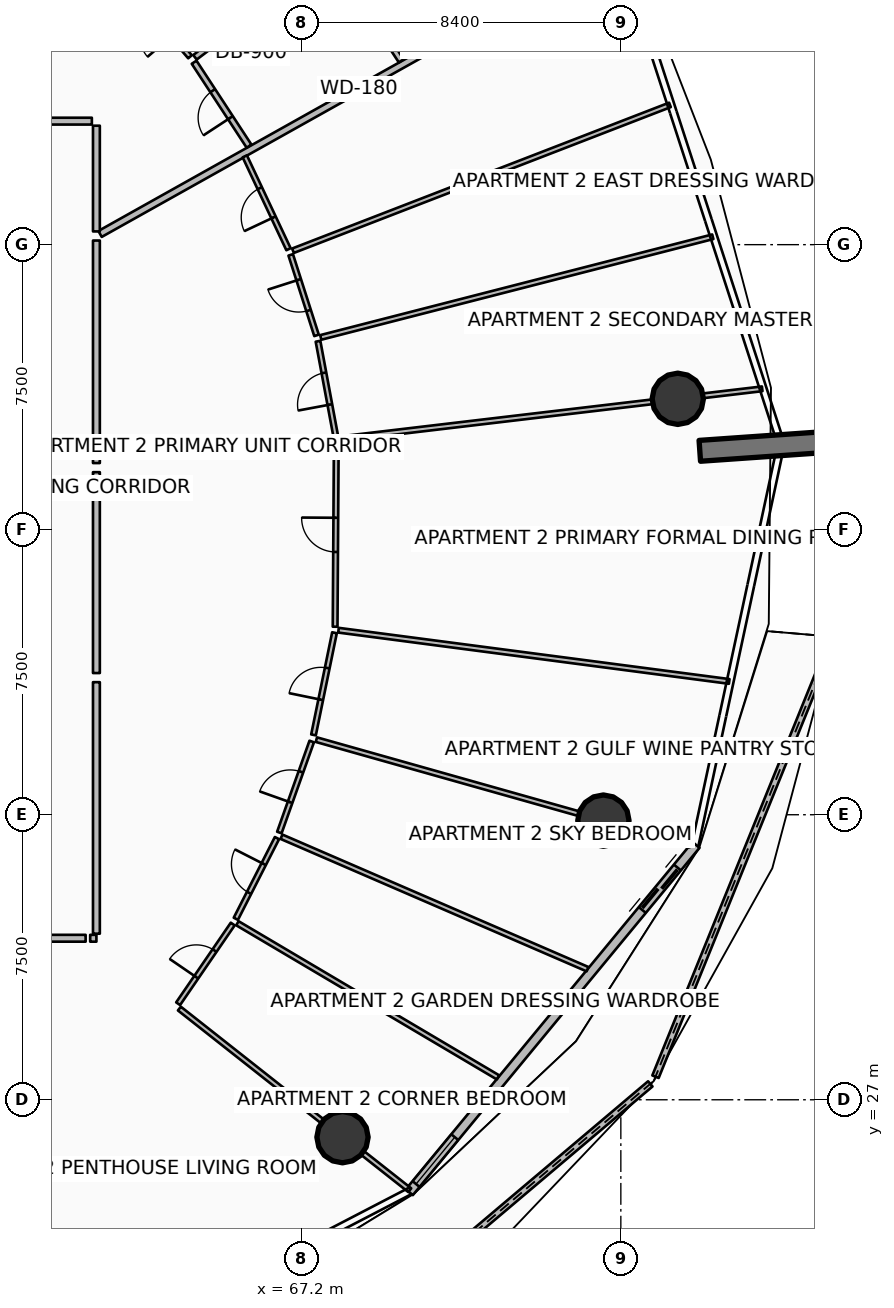
"""IFC4 building model, lengths in metres.
Left out: names, types, materials, properties, quantities, classifications, styles, units other than length and angle.
Written with IfcOpenShell. Run it as: python <this file> out.ifc"""

import sys

from ifc_helpers import new_model, si_unit, direction, frame, frame_2d, origin, origin_2d, place, context, subcontext, project, spatial, polyline, rectangle, circle, outline, extrude, element, fill, save


model = new_model("IFC4")
c1 = context("Model", 3, precision=1e-05, world=origin(), true_north=direction((0.0, 1.0)))
c2 = subcontext(c1, "Body", "Model", "MODEL_VIEW")
j1 = project(units=[si_unit("LENGTHUNIT", "METRE"), si_unit("PLANEANGLEUNIT", "RADIAN")], contexts=[c1])
p1 = place(None, origin())
s1 = spatial("IfcSite", under=j1, at=p1, CompositionType="ELEMENT")
p2 = place(p1, origin())
s2 = spatial("IfcBuilding", under=s1, at=p2, CompositionType="ELEMENT")
p3 = place(p2, frame((0.0, 0.0, 37.65)))
s3 = spatial("IfcBuildingStorey", under=s2, at=p3, CompositionType="ELEMENT", Elevation=37.65)
p4 = place(p3, frame((77.678, 44.075, 0.0), z_axis=(0.0, 0.0, 1.0), x_axis=(0.997564163539, 0.069754853754, 0.0)))
e1 = element("IfcWall", 1, at=p4, inside=s3, PredefinedType="SOLIDWALL", context=c2, shape_type="SweptSolid", body=[
    extrude(rectangle(XDim=3.5, YDim=0.55, at=frame_2d((1.75, 0.0))), origin(), (0.0, 0.0, 1.0), 3.75),
])
for number, where, z_axis, x_axis in (
    (2, (68.276, 26.016, 0.0), (0.0, 0.0, 1.0), (1.0, 0.0, 0.0)),
    (3, (75.141, 34.345, 0.0), (0.0, 0.0, 1.0), (1.0, 0.0, 0.0)),
    (4, (77.098, 45.444, 0.0), (0.0, 0.0, 1.0), (1.0, 0.0, 0.0)),
):
    element("IfcColumn", number, at=place(p3, frame(where, z_axis=z_axis, x_axis=x_axis)), inside=s3, PredefinedType="COLUMN", context=c2, shape_type="SweptSolid", body=[
        extrude(circle(Radius=0.675, at=origin_2d()), origin(), (0.0, 0.0, 1.0), 3.5),
    ])
p5 = place(p3, frame((67.267, 19.719, 0.0), z_axis=(0.0, 0.0, 1.0), x_axis=(0.763702211542, 0.645568688898, 0.0)))
e5 = element("IfcWall", 5, at=p5, inside=s3, PredefinedType="PARAPET", context=c2, shape_type="SweptSolid", body=[
    extrude(outline(polyline([(0.0, 0.0), (11.927, 0.0), (11.927, 1.632), (5.963, 1.798), (0.0, 1.86), (0.0, 0.0)])), frame((0.0, 0.09, 0.0), z_axis=(0.0, -1.0, 0.0), x_axis=(1.0, 0.0, 0.0)), (0.0, 0.0, 1.0), 0.18),
])
p6 = place(p3, frame((76.512, 27.607, 0.0), z_axis=(0.0, 0.0, 1.0), x_axis=(0.375733690411, 0.926727680546, 0.0)))
e6 = element("IfcWall", 6, at=p6, inside=s3, PredefinedType="PARAPET", context=c2, shape_type="SweptSolid", body=[
    extrude(outline(polyline([(0.0, 0.0), (12.491, 0.0), (12.491, 1.233), (6.246, 1.418), (0.0, 1.632), (0.0, 0.0)])), frame((0.0, 0.09, 0.0), z_axis=(0.0, -1.0, 0.0), x_axis=(1.0, 0.0, 0.0)), (0.0, 0.0, 1.0), 0.18),
])
p7 = place(p3, frame((70.033, 24.567, 0.0), z_axis=(0.0, 0.0, 1.0), x_axis=(0.636674332663, 0.771132799281, 0.0)))
e7 = element("IfcWall", 7, at=p7, inside=s3, PredefinedType="SOLIDWALL", context=c2, shape_type="SweptSolid", body=[
    extrude(rectangle(XDim=11.851, YDim=0.24, at=frame_2d((5.926, 0.0))), origin(), (0.0, 0.0, 1.0), 2.45),
])
p8 = place(p7, frame((9.631, 0.0, 0.0)))
e8 = element("IfcOpeningElement", 8, at=p8, cuts=e7, PredefinedType="OPENING", context=c2, shape_type="SweptSolid", body=[
    extrude(rectangle(XDim=1.45, YDim=2.15, at=frame_2d((0.725, 1.075))), frame((0.0, 0.13, 0.0), z_axis=(0.0, -1.0, 0.0), x_axis=(1.0, 0.0, 0.0)), (0.0, 0.0, 1.0), 0.26),
])
p9 = place(p7, frame((0.28, 0.0, 0.65)))
e9 = element("IfcOpeningElement", 9, at=p9, cuts=e7, PredefinedType="OPENING", context=c2, shape_type="SweptSolid", body=[
    extrude(rectangle(XDim=1.6, YDim=1.5, at=frame_2d((0.8, 0.75))), frame((0.0, 0.13, 0.0), z_axis=(0.0, -1.0, 0.0), x_axis=(1.0, 0.0, 0.0)), (0.0, 0.0, 1.0), 0.26),
])
p10 = place(p3, frame((61.896, 49.782, 0.0), z_axis=(0.0, 0.0, 1.0), x_axis=(0.872493215695, 0.488626225828, 0.0)))
e10 = element("IfcWall", 10, at=p10, inside=s3, PredefinedType="PARTITIONING", context=c2, shape_type="SweptSolid", body=[
    extrude(rectangle(XDim=15.612, YDim=0.18, at=frame_2d((7.806, 0.0))), origin(), (0.0, 0.0, 1.0), 2.867),
])
p11 = place(p3, frame((61.8, 49.848, 0.0), z_axis=(0.0, 0.0, 1.0), x_axis=(0.0, 1.0, 0.0)))
e11 = element("IfcWall", 11, at=p11, inside=s3, PredefinedType="PARTITIONING", context=c2, shape_type="SweptSolid", body=[
    extrude(rectangle(XDim=2.781, YDim=0.18, at=frame_2d((1.391, 0.0))), origin(), (0.0, 0.0, 1.0), 2.867),
])
p12 = place(p3, frame((61.68, 52.75, 0.0), z_axis=(0.0, 0.0, 1.0), x_axis=(-1.0, 0.0, 0.0)))
e12 = element("IfcWall", 12, at=p12, inside=s3, PredefinedType="PARTITIONING", context=c2, shape_type="SweptSolid", body=[
    extrude(rectangle(XDim=5.085, YDim=0.18, at=frame_2d((2.543, 0.0))), origin(), (0.0, 0.0, 1.0), 2.867),
])
p13 = place(p3, frame((65.816, 52.092, 0.0), z_axis=(0.0, 0.0, 1.0), x_axis=(-0.547635625156, 0.836716930664, 0.0)))
e13 = element("IfcWall", 13, at=p13, inside=s3, PredefinedType="PARTITIONING", context=c2, shape_type="SweptSolid", body=[
    extrude(rectangle(XDim=2.639, YDim=0.15, at=frame_2d((1.32, 0.0))), origin(), (0.0, 0.0, 1.0), 2.867),
])
p14 = place(p13, frame((0.895, 0.0, 0.0)))
e14 = element("IfcOpeningElement", 14, at=p14, cuts=e13, PredefinedType="OPENING", context=c2, shape_type="SweptSolid", body=[
    extrude(rectangle(XDim=0.85, YDim=2.06, at=frame_2d((0.425, 1.03))), frame((0.0, 0.085, 0.0), z_axis=(0.0, -1.0, 0.0), x_axis=(1.0, 0.0, 0.0)), (0.0, 0.0, 1.0), 0.17),
])
p15 = place(p3, frame((69.821, 54.335, 0.0), z_axis=(0.0, 0.0, 1.0), x_axis=(-0.547709492592, 0.836668579382, 0.0)))
e15 = element("IfcWall", 15, at=p15, inside=s3, PredefinedType="PARTITIONING", context=c2, shape_type="SweptSolid", body=[
    extrude(rectangle(XDim=3.273, YDim=0.15, at=frame_2d((1.637, 0.0))), origin(), (0.0, 0.0, 1.0), 2.867),
])
p16 = place(p3, frame((64.394, 54.43, 0.0), z_axis=(0.0, 0.0, 1.0), x_axis=(0.796855751732, 0.604169604442, 0.0)))
e16 = element("IfcWall", 16, at=p16, inside=s3, PredefinedType="PARTITIONING", context=c2, shape_type="SweptSolid", body=[
    extrude(rectangle(XDim=4.46, YDim=0.15, at=frame_2d((2.23, 0.0))), origin(), (0.0, 0.0, 1.0), 2.94),
])
p17 = place(p3, frame((64.263, 54.444, 0.0), z_axis=(0.0, 0.0, 1.0), x_axis=(-0.651227570151, 0.758882502022, 0.0)))
e17 = element("IfcWall", 17, at=p17, inside=s3, PredefinedType="PARTITIONING", context=c2, shape_type="SweptSolid", body=[
    extrude(rectangle(XDim=2.304, YDim=0.125, at=frame_2d((1.152, 0.0))), origin(), (0.0, 0.0, 1.0), 2.94),
])
p18 = place(p17, frame((0.727, 0.0, 0.0)))
e18 = element("IfcOpeningElement", 18, at=p18, cuts=e17, PredefinedType="OPENING", context=c2, shape_type="SweptSolid", body=[
    extrude(rectangle(XDim=0.85, YDim=2.06, at=frame_2d((0.425, 1.03))), frame((0.0, 0.073, 0.0), z_axis=(0.0, -1.0, 0.0), x_axis=(1.0, 0.0, 0.0)), (0.0, 0.0, 1.0), 0.145),
])
p19 = place(p3, frame((54.14, 31.25, 0.0), z_axis=(0.0, 0.0, 1.0), x_axis=(1.0, 0.0, 0.0)))
e19 = element("IfcWall", 19, at=p19, inside=s3, PredefinedType="PARTITIONING", context=c2, shape_type="SweptSolid", body=[
    extrude(rectangle(XDim=7.376, YDim=0.18, at=frame_2d((3.688, 0.0))), origin(), (0.0, 0.0, 1.0), 2.867),
])
p20 = place(p19, frame((3.138, 0.0, 0.0)))
e20 = element("IfcOpeningElement", 20, at=p20, cuts=e19, PredefinedType="OPENING", context=c2, shape_type="SweptSolid", body=[
    extrude(rectangle(XDim=1.1, YDim=2.1, at=frame_2d((0.55, 1.05))), frame((0.0, 0.1, 0.0), z_axis=(0.0, -1.0, 0.0), x_axis=(1.0, 0.0, 0.0)), (0.0, 0.0, 1.0), 0.2),
])
p21 = place(p3, frame((61.636, 31.25, 0.0), z_axis=(0.0, 0.0, 1.0), x_axis=(1.0, 0.0, 0.0)))
e21 = element("IfcWall", 21, at=p21, inside=s3, PredefinedType="PARTITIONING", context=c2, shape_type="SweptSolid", body=[
    extrude(rectangle(XDim=0.164, YDim=0.18, at=frame_2d((0.082, 0.0))), origin(), (0.0, 0.0, 1.0), 2.867),
])
p22 = place(p3, frame((61.8, 31.37, 0.0), z_axis=(0.0, 0.0, 1.0), x_axis=(0.0, 1.0, 0.0)))
e22 = element("IfcWall", 22, at=p22, inside=s3, PredefinedType="PARTITIONING", context=c2, shape_type="SweptSolid", body=[
    extrude(rectangle(XDim=6.618, YDim=0.18, at=frame_2d((3.309, 0.0))), origin(), (0.0, 0.0, 1.0), 2.867),
])
p23 = place(p3, frame((63.983, 29.4, 0.0), z_axis=(0.0, 0.0, 1.0), x_axis=(0.785322984339, -0.619086270457, 0.0)))
e23 = element("IfcWall", 23, at=p23, inside=s3, PredefinedType="PARTITIONING", context=c2, shape_type="SweptSolid", body=[
    extrude(rectangle(XDim=7.719, YDim=0.125, at=frame_2d((3.86, 0.0))), origin(), (0.0, 0.0, 1.0), 2.867),
])
p24 = place(p3, frame((65.51, 31.645, 0.0), z_axis=(0.0, 0.0, 1.0), x_axis=(0.86074163886, -0.509042072065, 0.0)))
e24 = element("IfcWall", 24, at=p24, inside=s3, PredefinedType="PARTITIONING", context=c2, shape_type="SweptSolid", body=[
    extrude(rectangle(XDim=7.968, YDim=0.125, at=frame_2d((3.984, 0.0))), origin(), (0.0, 0.0, 1.0), 2.94),
])
p25 = place(p3, frame((66.67, 33.921, 0.0), z_axis=(0.0, 0.0, 1.0), x_axis=(0.917747697885, -0.397163899451, 0.0)))
e25 = element("IfcWall", 25, at=p25, inside=s3, PredefinedType="PARTITIONING", context=c2, shape_type="SweptSolid", body=[
    extrude(rectangle(XDim=8.775, YDim=0.125, at=frame_2d((4.387, 0.0))), origin(), (0.0, 0.0, 1.0), 2.94),
])
p26 = place(p3, frame((63.95, 29.528, 0.0), z_axis=(0.0, 0.0, 1.0), x_axis=(0.565358509176, 0.824845292223, 0.0)))
e26 = element("IfcWall", 26, at=p26, inside=s3, PredefinedType="PARTITIONING", context=c2, shape_type="SweptSolid", body=[
    extrude(rectangle(XDim=2.542, YDim=0.125, at=frame_2d((1.271, 0.0))), origin(), (0.0, 0.0, 1.0), 2.867),
])
p27 = place(p26, frame((0.846, 0.0, 0.0)))
e27 = element("IfcOpeningElement", 27, at=p27, cuts=e26, PredefinedType="OPENING", context=c2, shape_type="SweptSolid", body=[
    extrude(rectangle(XDim=0.85, YDim=2.06, at=frame_2d((0.425, 1.03))), frame((0.0, 0.073, 0.0), z_axis=(0.0, -1.0, 0.0), x_axis=(1.0, 0.0, 0.0)), (0.0, 0.0, 1.0), 0.145),
])
p28 = place(p3, frame((65.469, 31.762, 0.0), z_axis=(0.0, 0.0, 1.0), x_axis=(0.45400250644, 0.891000406367, 0.0)))
e28 = element("IfcWall", 28, at=p28, inside=s3, PredefinedType="PARTITIONING", context=c2, shape_type="SweptSolid", body=[
    extrude(rectangle(XDim=2.383, YDim=0.125, at=frame_2d((1.192, 0.0))), origin(), (0.0, 0.0, 1.0), 2.94),
])
p29 = place(p28, frame((0.767, 0.0, 0.0)))
e29 = element("IfcOpeningElement", 29, at=p29, cuts=e28, PredefinedType="OPENING", context=c2, shape_type="SweptSolid", body=[
    extrude(rectangle(XDim=0.85, YDim=2.06, at=frame_2d((0.425, 1.03))), frame((0.0, 0.073, 0.0), z_axis=(0.0, -1.0, 0.0), x_axis=(1.0, 0.0, 0.0)), (0.0, 0.0, 1.0), 0.145),
])
p30 = place(p3, frame((66.614, 34.032, 0.0), z_axis=(0.0, 0.0, 1.0), x_axis=(0.335094930465, 0.942184370268, 0.0)))
e30 = element("IfcWall", 30, at=p30, inside=s3, PredefinedType="PARTITIONING", context=c2, shape_type="SweptSolid", body=[
    extrude(rectangle(XDim=2.542, YDim=0.125, at=frame_2d((1.271, 0.0))), origin(), (0.0, 0.0, 1.0), 2.867),
])
p31 = place(p30, frame((0.846, 0.0, 0.0)))
e31 = element("IfcOpeningElement", 31, at=p31, cuts=e30, PredefinedType="OPENING", context=c2, shape_type="SweptSolid", body=[
    extrude(rectangle(XDim=0.85, YDim=2.06, at=frame_2d((0.425, 1.03))), frame((0.0, 0.073, 0.0), z_axis=(0.0, -1.0, 0.0), x_axis=(1.0, 0.0, 0.0)), (0.0, 0.0, 1.0), 0.145),
])
p32 = place(p3, frame((61.8, 38.228, 0.0), z_axis=(0.0, 0.0, 1.0), x_axis=(0.0, 1.0, 0.0)))
e32 = element("IfcWall", 32, at=p32, inside=s3, PredefinedType="PARTITIONING", context=c2, shape_type="SweptSolid", body=[
    extrude(rectangle(XDim=5.285, YDim=0.18, at=frame_2d((2.643, 0.0))), origin(), (0.0, 0.0, 1.0), 2.867),
])
p33 = place(p3, frame((67.589, 36.475, 0.0), z_axis=(0.0, 0.0, 1.0), x_axis=(0.962457516126, -0.271432366627, 0.0)))
e33 = element("IfcWall", 33, at=p33, inside=s3, PredefinedType="PARTITIONING", context=c2, shape_type="SweptSolid", body=[
    extrude(rectangle(XDim=10.221, YDim=0.125, at=frame_2d((5.111, 0.0))), origin(), (0.0, 0.0, 1.0), 2.867),
])
p34 = place(p3, frame((68.17, 39.355, 0.0), z_axis=(0.0, 0.0, 1.0), x_axis=(0.991512615626, -0.130010511326, 0.0)))
e34 = element("IfcWall", 34, at=p34, inside=s3, PredefinedType="PARTITIONING", context=c2, shape_type="SweptSolid", body=[
    extrude(rectangle(XDim=10.369, YDim=0.125, at=frame_2d((5.185, 0.0))), origin(), (0.0, 0.0, 1.0), 2.94),
])
p35 = place(p3, frame((67.513, 36.601, 0.0), z_axis=(0.0, 0.0, 1.0), x_axis=(0.201246233374, 0.979540684991, 0.0)))
e35 = element("IfcWall", 35, at=p35, inside=s3, PredefinedType="PARTITIONING", context=c2, shape_type="SweptSolid", body=[
    extrude(rectangle(XDim=2.744, YDim=0.125, at=frame_2d((1.372, 0.0))), origin(), (0.0, 0.0, 1.0), 2.867),
])
p36 = place(p35, frame((0.947, 0.0, 0.0)))
e36 = element("IfcOpeningElement", 36, at=p36, cuts=e35, PredefinedType="OPENING", context=c2, shape_type="SweptSolid", body=[
    extrude(rectangle(XDim=0.85, YDim=2.06, at=frame_2d((0.425, 1.03))), frame((0.0, 0.073, 0.0), z_axis=(0.0, -1.0, 0.0), x_axis=(1.0, 0.0, 0.0)), (0.0, 0.0, 1.0), 0.145),
])
p37 = place(p3, frame((68.082, 39.447, 0.0), z_axis=(0.0, 0.0, 1.0), x_axis=(0.006313643226, 0.999980068756, 0.0)))
e37 = element("IfcWall", 37, at=p37, inside=s3, PredefinedType="PARTITIONING", context=c2, shape_type="SweptSolid", body=[
    extrude(rectangle(XDim=4.833, YDim=0.125, at=frame_2d((2.417, 0.0))), origin(), (0.0, 0.0, 1.0), 2.867),
])
p38 = place(p37, frame((1.967, 0.0, 0.0)))
e38 = element("IfcOpeningElement", 38, at=p38, cuts=e37, PredefinedType="OPENING", context=c2, shape_type="SweptSolid", body=[
    extrude(rectangle(XDim=0.9, YDim=2.08, at=frame_2d((0.45, 1.04))), frame((0.0, 0.073, 0.0), z_axis=(0.0, -1.0, 0.0), x_axis=(1.0, 0.0, 0.0)), (0.0, 0.0, 1.0), 0.145),
])
p39 = place(p3, frame((61.8, 43.753, 0.0), z_axis=(0.0, 0.0, 1.0), x_axis=(0.0, 1.0, 0.0)))
e39 = element("IfcWall", 39, at=p39, inside=s3, PredefinedType="PARTITIONING", context=c2, shape_type="SweptSolid", body=[
    extrude(rectangle(XDim=5.855, YDim=0.18, at=frame_2d((2.927, 0.0))), origin(), (0.0, 0.0, 1.0), 2.867),
])
p40 = place(p3, frame((68.212, 44.392, 0.0), z_axis=(0.0, 0.0, 1.0), x_axis=(0.993068868454, 0.117533920671, 0.0)))
e40 = element("IfcWall", 40, at=p40, inside=s3, PredefinedType="PARTITIONING", context=c2, shape_type="SweptSolid", body=[
    extrude(rectangle(XDim=11.186, YDim=0.125, at=frame_2d((5.593, 0.0))), origin(), (0.0, 0.0, 1.0), 2.867),
])
p41 = place(p3, frame((67.704, 47.059, 0.0), z_axis=(0.0, 0.0, 1.0), x_axis=(0.968581650893, 0.248695769071, 0.0)))
e41 = element("IfcWall", 41, at=p41, inside=s3, PredefinedType="PARTITIONING", context=c2, shape_type="SweptSolid", body=[
    extrude(rectangle(XDim=10.65, YDim=0.125, at=frame_2d((5.325, 0.0))), origin(), (0.0, 0.0, 1.0), 2.94),
])
p42 = place(p3, frame((66.973, 49.34, 0.0), z_axis=(0.0, 0.0, 1.0), x_axis=(0.93264336061, 0.360799614621, 0.0)))
e42 = element("IfcWall", 42, at=p42, inside=s3, PredefinedType="PARTITIONING", context=c2, shape_type="SweptSolid", body=[
    extrude(rectangle(XDim=10.636, YDim=0.125, at=frame_2d((5.318, 0.0))), origin(), (0.0, 0.0, 1.0), 2.94),
])
p43 = place(p3, frame((68.098, 44.459, 0.0), z_axis=(0.0, 0.0, 1.0), x_axis=(-0.183523097457, 0.983015397997, 0.0)))
e43 = element("IfcWall", 43, at=p43, inside=s3, PredefinedType="PARTITIONING", context=c2, shape_type="SweptSolid", body=[
    extrude(rectangle(XDim=2.542, YDim=0.125, at=frame_2d((1.271, 0.0))), origin(), (0.0, 0.0, 1.0), 2.867),
])
p44 = place(p43, frame((0.846, 0.0, 0.0)))
e44 = element("IfcOpeningElement", 44, at=p44, cuts=e43, PredefinedType="OPENING", context=c2, shape_type="SweptSolid", body=[
    extrude(rectangle(XDim=0.85, YDim=2.06, at=frame_2d((0.425, 1.03))), frame((0.0, 0.073, 0.0), z_axis=(0.0, -1.0, 0.0), x_axis=(1.0, 0.0, 0.0)), (0.0, 0.0, 1.0), 0.145),
])
p45 = place(p3, frame((67.592, 47.113, 0.0), z_axis=(0.0, 0.0, 1.0), x_axis=(-0.305309270218, 0.952253248626, 0.0)))
e45 = element("IfcWall", 45, at=p45, inside=s3, PredefinedType="PARTITIONING", context=c2, shape_type="SweptSolid", body=[
    extrude(rectangle(XDim=2.225, YDim=0.125, at=frame_2d((1.112, 0.0))), origin(), (0.0, 0.0, 1.0), 2.94),
])
p46 = place(p45, frame((0.687, 0.0, 0.0)))
e46 = element("IfcOpeningElement", 46, at=p46, cuts=e45, PredefinedType="OPENING", context=c2, shape_type="SweptSolid", body=[
    extrude(rectangle(XDim=0.85, YDim=2.06, at=frame_2d((0.425, 1.03))), frame((0.0, 0.073, 0.0), z_axis=(0.0, -1.0, 0.0), x_axis=(1.0, 0.0, 0.0)), (0.0, 0.0, 1.0), 0.145),
])
p47 = place(p3, frame((66.854, 49.38, 0.0), z_axis=(0.0, 0.0, 1.0), x_axis=(-0.425714313245, 0.904857626093, 0.0)))
e47 = element("IfcWall", 47, at=p47, inside=s3, PredefinedType="PARTITIONING", context=c2, shape_type="SweptSolid", body=[
    extrude(rectangle(XDim=2.7, YDim=0.125, at=frame_2d((1.35, 0.0))), origin(), (0.0, 0.0, 1.0), 2.867),
])
p48 = place(p47, frame((0.925, 0.0, 0.0)))
e48 = element("IfcOpeningElement", 48, at=p48, cuts=e47, PredefinedType="OPENING", context=c2, shape_type="SweptSolid", body=[
    extrude(rectangle(XDim=0.85, YDim=2.06, at=frame_2d((0.425, 1.03))), frame((0.0, 0.073, 0.0), z_axis=(0.0, -1.0, 0.0), x_axis=(1.0, 0.0, 0.0)), (0.0, 0.0, 1.0), 0.145),
])
p49 = place(p8, origin())
e49 = element("IfcDoor", 49, at=p49, inside=s3, OperationType="DOUBLE_DOOR_SLIDING", PredefinedType="DOOR", context=c2, shape_type="SweptSolid", body=[
    extrude(rectangle(XDim=1.45, YDim=2.15, at=frame_2d((0.725, 1.075))), frame((0.0, 0.025, 0.0), z_axis=(0.0, -1.0, 0.0), x_axis=(1.0, 0.0, 0.0)), (0.0, 0.0, 1.0), 0.05),
])
fill(e8, e49)
p50 = place(p9, origin())
e50 = element("IfcWindow", 50, at=p50, inside=s3, PartitioningType="SINGLE_PANEL", PredefinedType="WINDOW", context=c2, shape_type="SweptSolid", body=[
    extrude(rectangle(XDim=1.6, YDim=1.5, at=frame_2d((0.8, 0.75))), frame((0.0, 0.03, 0.0), z_axis=(0.0, -1.0, 0.0), x_axis=(1.0, 0.0, 0.0)), (0.0, 0.0, 1.0), 0.06),
])
fill(e9, e50)
p51 = place(p14, origin())
e51 = element("IfcDoor", 51, at=p51, inside=s3, OperationType="SINGLE_SWING_LEFT", PredefinedType="DOOR", context=c2, shape_type="SweptSolid", body=[
    extrude(rectangle(XDim=0.85, YDim=2.06, at=frame_2d((0.425, 1.03))), frame((0.0, 0.025, 0.0), z_axis=(0.0, -1.0, 0.0), x_axis=(1.0, 0.0, 0.0)), (0.0, 0.0, 1.0), 0.05),
])
fill(e14, e51)
p52 = place(p27, origin())
e52 = element("IfcDoor", 52, at=p52, inside=s3, OperationType="SINGLE_SWING_LEFT", PredefinedType="DOOR", context=c2, shape_type="SweptSolid", body=[
    extrude(rectangle(XDim=0.85, YDim=2.06, at=frame_2d((0.425, 1.03))), frame((0.0, 0.025, 0.0), z_axis=(0.0, -1.0, 0.0), x_axis=(1.0, 0.0, 0.0)), (0.0, 0.0, 1.0), 0.05),
])
fill(e27, e52)
p53 = place(p29, origin())
e53 = element("IfcDoor", 53, at=p53, inside=s3, OperationType="SINGLE_SWING_RIGHT", PredefinedType="DOOR", context=c2, shape_type="SweptSolid", body=[
    extrude(rectangle(XDim=0.85, YDim=2.06, at=frame_2d((0.425, 1.03))), frame((0.0, 0.025, 0.0), z_axis=(0.0, -1.0, 0.0), x_axis=(1.0, 0.0, 0.0)), (0.0, 0.0, 1.0), 0.05),
])
fill(e29, e53)
p54 = place(p31, origin())
e54 = element("IfcDoor", 54, at=p54, inside=s3, OperationType="SINGLE_SWING_LEFT", PredefinedType="DOOR", context=c2, shape_type="SweptSolid", body=[
    extrude(rectangle(XDim=0.85, YDim=2.06, at=frame_2d((0.425, 1.03))), frame((0.0, 0.025, 0.0), z_axis=(0.0, -1.0, 0.0), x_axis=(1.0, 0.0, 0.0)), (0.0, 0.0, 1.0), 0.05),
])
fill(e31, e54)
p55 = place(p36, origin())
e55 = element("IfcDoor", 55, at=p55, inside=s3, OperationType="SINGLE_SWING_LEFT", PredefinedType="DOOR", context=c2, shape_type="SweptSolid", body=[
    extrude(rectangle(XDim=0.85, YDim=2.06, at=frame_2d((0.425, 1.03))), frame((0.0, 0.025, 0.0), z_axis=(0.0, -1.0, 0.0), x_axis=(1.0, 0.0, 0.0)), (0.0, 0.0, 1.0), 0.05),
])
fill(e36, e55)
p56 = place(p38, origin())
e56 = element("IfcDoor", 56, at=p56, inside=s3, OperationType="SINGLE_SWING_RIGHT", PredefinedType="DOOR", context=c2, shape_type="SweptSolid", body=[
    extrude(rectangle(XDim=0.9, YDim=2.08, at=frame_2d((0.45, 1.04))), frame((0.0, 0.025, 0.0), z_axis=(0.0, -1.0, 0.0), x_axis=(1.0, 0.0, 0.0)), (0.0, 0.0, 1.0), 0.05),
])
fill(e38, e56)
p57 = place(p44, origin())
e57 = element("IfcDoor", 57, at=p57, inside=s3, OperationType="SINGLE_SWING_LEFT", PredefinedType="DOOR", context=c2, shape_type="SweptSolid", body=[
    extrude(rectangle(XDim=0.85, YDim=2.06, at=frame_2d((0.425, 1.03))), frame((0.0, 0.025, 0.0), z_axis=(0.0, -1.0, 0.0), x_axis=(1.0, 0.0, 0.0)), (0.0, 0.0, 1.0), 0.05),
])
fill(e44, e57)
p58 = place(p46, origin())
e58 = element("IfcDoor", 58, at=p58, inside=s3, OperationType="SINGLE_SWING_RIGHT", PredefinedType="DOOR", context=c2, shape_type="SweptSolid", body=[
    extrude(rectangle(XDim=0.85, YDim=2.06, at=frame_2d((0.425, 1.03))), frame((0.0, 0.025, 0.0), z_axis=(0.0, -1.0, 0.0), x_axis=(1.0, 0.0, 0.0)), (0.0, 0.0, 1.0), 0.05),
])
fill(e46, e58)
p59 = place(p48, origin())
e59 = element("IfcDoor", 59, at=p59, inside=s3, OperationType="SINGLE_SWING_LEFT", PredefinedType="DOOR", context=c2, shape_type="SweptSolid", body=[
    extrude(rectangle(XDim=0.85, YDim=2.06, at=frame_2d((0.425, 1.03))), frame((0.0, 0.025, 0.0), z_axis=(0.0, -1.0, 0.0), x_axis=(1.0, 0.0, 0.0)), (0.0, 0.0, 1.0), 0.05),
])
fill(e48, e59)
save(model, sys.argv[1])
